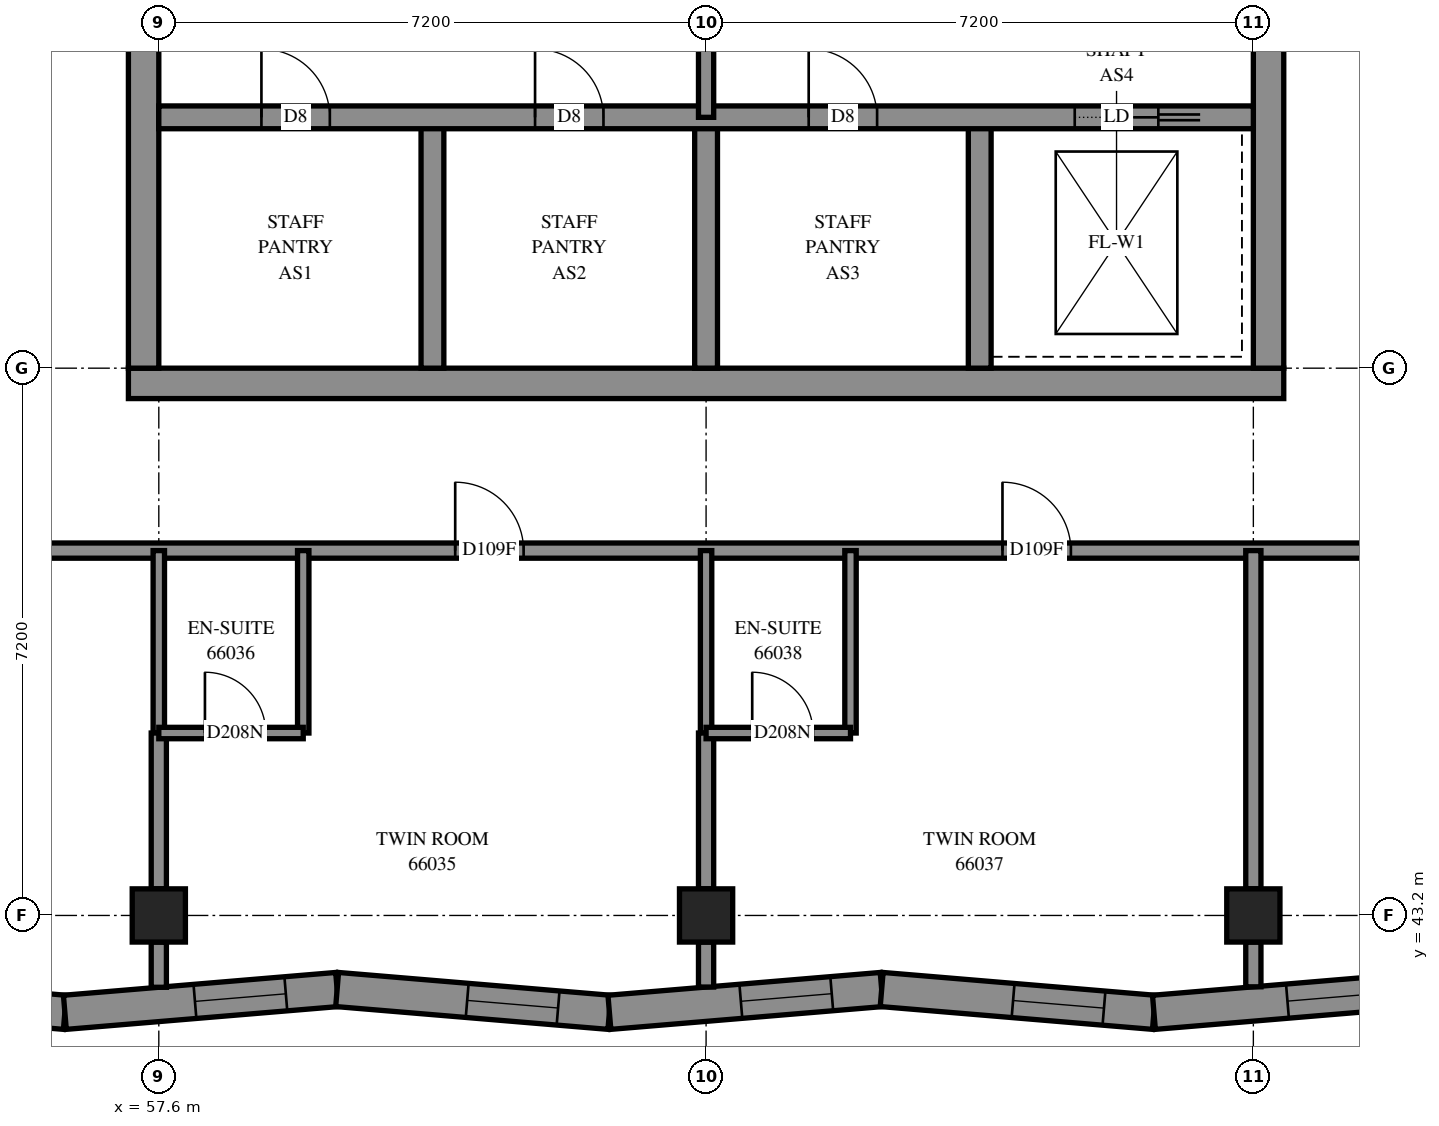
"""IFC4 building model, lengths in metres.
Left out: names, types, materials, properties, quantities, classifications, styles, units other than length and angle.
Written with IfcOpenShell. Run it as: python <this file> out.ifc"""

import sys

from ifc_helpers import new_model, si_unit, direction, frame, frame_2d, origin, origin_2d, place, context, subcontext, project, spatial, polyline, rectangle, outline, extrude, element, fill, save


model = new_model("IFC4")
c1 = context("Model", 3, precision=1e-05, world=origin(), true_north=direction((0.0, 1.0)))
c2 = subcontext(c1, "Body", "Model", "MODEL_VIEW")
j1 = project(units=[si_unit("LENGTHUNIT", "METRE"), si_unit("PLANEANGLEUNIT", "RADIAN")], contexts=[c1])
p1 = place(None, origin())
s1 = spatial("IfcSite", under=j1, at=p1, CompositionType="ELEMENT")
p2 = place(p1, origin())
s2 = spatial("IfcBuilding", under=s1, at=p2, CompositionType="ELEMENT")
p3 = place(p2, frame((0.0, 0.0, 243.8)))
s3 = spatial("IfcBuildingStorey", under=s2, at=p3, CompositionType="ELEMENT", Elevation=243.8)
for number, where, z_axis, x_axis in (
    (1, (57.6, 43.2, 0.0), (0.0, 0.0, 1.0), (1.0, 0.0, 0.0)),
    (2, (64.8, 43.2, 0.0), (0.0, 0.0, 1.0), (1.0, 0.0, 0.0)),
    (3, (72.0, 43.2, 0.0), (0.0, 0.0, 1.0), (1.0, 0.0, 0.0)),
):
    element("IfcColumn", number, at=place(p3, frame(where, z_axis=z_axis, x_axis=x_axis)), inside=s3, PredefinedType="COLUMN", context=c2, shape_type="SweptSolid", body=[
        extrude(rectangle(XDim=0.7, YDim=0.7, at=origin_2d()), origin(), (0.0, 0.0, 1.0), 3.1),
    ])
p4 = place(p3, frame((57.2, 50.2, -0.3), z_axis=(0.0, 0.0, 1.0), x_axis=(1.0, 0.0, 0.0)))
e4 = element("IfcWall", 4, at=p4, inside=s3, PredefinedType="SHEAR", context=c2, shape_type="SweptSolid", body=[
    extrude(rectangle(XDim=15.2, YDim=0.4, at=frame_2d((7.6, 0.0))), origin(), (0.0, 0.0, 1.0), 2.7),
])
p5 = place(p3, frame((57.4, 50.4, -0.3), z_axis=(0.0, 0.0, 1.0), x_axis=(0.0, 1.0, 0.0)))
e5 = element("IfcWall", 5, at=p5, inside=s3, PredefinedType="SHEAR", context=c2, shape_type="SweptSolid", body=[
    extrude(rectangle(XDim=14.4, YDim=0.4, at=frame_2d((7.2, 0.0))), origin(), (0.0, 0.0, 1.0), 2.7),
])
p6 = place(p5, frame((4.55, 0.0, 0.3)))
e6 = element("IfcOpeningElement", 6, at=p6, cuts=e5, PredefinedType="OPENING", context=c2, shape_type="SweptSolid", body=[
    extrude(rectangle(XDim=1.1, YDim=2.1, at=frame_2d((0.55, 1.05))), frame((0.0, 0.21, 0.0), z_axis=(0.0, -1.0, 0.0), x_axis=(1.0, 0.0, 0.0)), (0.0, 0.0, 1.0), 0.42),
])
p7 = place(p5, frame((11.35, 0.0, 0.3)))
e7 = element("IfcOpeningElement", 7, at=p7, cuts=e5, PredefinedType="OPENING", context=c2, shape_type="SweptSolid", body=[
    extrude(rectangle(XDim=1.1, YDim=2.1, at=frame_2d((0.55, 1.05))), frame((0.0, 0.21, 0.0), z_axis=(0.0, -1.0, 0.0), x_axis=(1.0, 0.0, 0.0)), (0.0, 0.0, 1.0), 0.42),
])
p8 = place(p3, frame((72.2, 50.4, -0.3), z_axis=(0.0, 0.0, 1.0), x_axis=(0.0, 1.0, 0.0)))
e8 = element("IfcWall", 8, at=p8, inside=s3, PredefinedType="SHEAR", context=c2, shape_type="SweptSolid", body=[
    extrude(rectangle(XDim=14.4, YDim=0.4, at=frame_2d((7.2, 0.0))), origin(), (0.0, 0.0, 1.0), 2.7),
])
p9 = place(p8, frame((4.55, 0.0, 0.3)))
e9 = element("IfcOpeningElement", 9, at=p9, cuts=e8, PredefinedType="OPENING", context=c2, shape_type="SweptSolid", body=[
    extrude(rectangle(XDim=1.1, YDim=2.1, at=frame_2d((0.55, 1.05))), frame((0.0, 0.21, 0.0), z_axis=(0.0, -1.0, 0.0), x_axis=(1.0, 0.0, 0.0)), (0.0, 0.0, 1.0), 0.42),
])
p10 = place(p8, frame((11.35, 0.0, 0.3)))
e10 = element("IfcOpeningElement", 10, at=p10, cuts=e8, PredefinedType="OPENING", context=c2, shape_type="SweptSolid", body=[
    extrude(rectangle(XDim=1.1, YDim=2.1, at=frame_2d((0.55, 1.05))), frame((0.0, 0.21, 0.0), z_axis=(0.0, -1.0, 0.0), x_axis=(1.0, 0.0, 0.0)), (0.0, 0.0, 1.0), 0.42),
])
for number, where, z_axis, x_axis in (
    (11, (61.2, 50.4, 0.0), (0.0, 0.0, 1.0), (0.0, 1.0, 0.0)),
    (12, (64.8, 50.4, 0.0), (0.0, 0.0, 1.0), (0.0, 1.0, 0.0)),
    (13, (68.4, 50.4, 0.0), (0.0, 0.0, 1.0), (0.0, 1.0, 0.0)),
):
    element("IfcWall", number, at=place(p3, frame(where, z_axis=z_axis, x_axis=x_axis)), inside=s3, PredefinedType="SOLIDWALL", context=c2, shape_type="SweptSolid", body=[
        extrude(rectangle(XDim=3.3, YDim=0.3, at=frame_2d((1.65, 0.0))), origin(), (0.0, 0.0, 1.0), 3.1),
    ])
p11 = place(p3, frame((57.6, 53.7, 0.0), z_axis=(0.0, 0.0, 1.0), x_axis=(1.0, 0.0, 0.0)))
e14 = element("IfcWall", 14, at=p11, inside=s3, PredefinedType="SOLIDWALL", context=c2, shape_type="SweptSolid", body=[
    extrude(rectangle(XDim=14.4, YDim=0.3, at=frame_2d((7.2, 0.0))), origin(), (0.0, 0.0, 1.0), 3.1),
])
p12 = place(p11, frame((1.35, 0.0, 0.0)))
e15 = element("IfcOpeningElement", 15, at=p12, cuts=e14, PredefinedType="OPENING", context=c2, shape_type="SweptSolid", body=[
    extrude(rectangle(XDim=0.9, YDim=2.1, at=frame_2d((0.45, 1.05))), frame((0.0, 0.16, 0.0), z_axis=(0.0, -1.0, 0.0), x_axis=(1.0, 0.0, 0.0)), (0.0, 0.0, 1.0), 0.32),
])
p13 = place(p11, frame((4.95, 0.0, 0.0)))
e16 = element("IfcOpeningElement", 16, at=p13, cuts=e14, PredefinedType="OPENING", context=c2, shape_type="SweptSolid", body=[
    extrude(rectangle(XDim=0.9, YDim=2.1, at=frame_2d((0.45, 1.05))), frame((0.0, 0.16, 0.0), z_axis=(0.0, -1.0, 0.0), x_axis=(1.0, 0.0, 0.0)), (0.0, 0.0, 1.0), 0.32),
])
p14 = place(p11, frame((8.55, 0.0, 0.0)))
e17 = element("IfcOpeningElement", 17, at=p14, cuts=e14, PredefinedType="OPENING", context=c2, shape_type="SweptSolid", body=[
    extrude(rectangle(XDim=0.9, YDim=2.1, at=frame_2d((0.45, 1.05))), frame((0.0, 0.16, 0.0), z_axis=(0.0, -1.0, 0.0), x_axis=(1.0, 0.0, 0.0)), (0.0, 0.0, 1.0), 0.32),
])
p15 = place(p11, frame((12.05, 0.0, 0.0)))
e18 = element("IfcOpeningElement", 18, at=p15, cuts=e14, PredefinedType="OPENING", context=c2, shape_type="SweptSolid", body=[
    extrude(rectangle(XDim=1.1, YDim=2.1, at=frame_2d((0.55, 1.05))), frame((0.0, 0.16, 0.0), z_axis=(0.0, -1.0, 0.0), x_axis=(1.0, 0.0, 0.0)), (0.0, 0.0, 1.0), 0.32),
])
p16 = place(p3, frame((52.764, 42.227, 0.0), z_axis=(0.0, 0.0, 1.0), x_axis=(0.9965122743, -0.0834463132, 0.0)))
e19 = element("IfcWall", 19, at=p16, inside=s3, PredefinedType="SOLIDWALL", context=c2, shape_type="SweptSolid", body=[
    extrude(outline(polyline([(0.037, -0.225), (3.632, -0.225), (3.594, 0.225), (-0.037, 0.225), (0.037, -0.225)])), origin(), (0.0, 0.0, 1.0), 3.1),
])
p17 = place(p16, frame((1.718, 0.0, 0.45)))
e20 = element("IfcOpeningElement", 20, at=p17, cuts=e19, PredefinedType="OPENING", context=c2, shape_type="SweptSolid", body=[
    extrude(rectangle(XDim=1.2, YDim=2.55, at=frame_2d((0.6, 1.275))), frame((0.0, 0.235, 0.0), z_axis=(0.0, -1.0, 0.0), x_axis=(1.0, 0.0, 0.0)), (0.0, 0.0, 1.0), 0.47),
])
p18 = place(p3, frame((56.364, 41.926, 0.0), z_axis=(0.0, 0.0, 1.0), x_axis=(0.9965111369, 0.0834598942, 0.0)))
e21 = element("IfcWall", 21, at=p18, inside=s3, PredefinedType="SOLIDWALL", context=c2, shape_type="SweptSolid", body=[
    extrude(outline(polyline([(-0.019, -0.225), (3.576, -0.225), (3.613, 0.225), (0.019, 0.225), (-0.019, -0.225)])), origin(), (0.0, 0.0, 1.0), 3.1),
])
p19 = place(p18, frame((1.717, 0.0, 0.45)))
e22 = element("IfcOpeningElement", 22, at=p19, cuts=e21, PredefinedType="OPENING", context=c2, shape_type="SweptSolid", body=[
    extrude(rectangle(XDim=1.2, YDim=2.55, at=frame_2d((0.6, 1.275))), frame((0.0, 0.235, 0.0), z_axis=(0.0, -1.0, 0.0), x_axis=(1.0, 0.0, 0.0)), (0.0, 0.0, 1.0), 0.47),
])
p20 = place(p3, frame((59.946, 42.226, 0.0), z_axis=(0.0, 0.0, 1.0), x_axis=(0.9965109432, -0.083462208, 0.0)))
e23 = element("IfcWall", 23, at=p20, inside=s3, PredefinedType="SOLIDWALL", context=c2, shape_type="SweptSolid", body=[
    extrude(outline(polyline([(0.019, -0.225), (3.613, -0.225), (3.576, 0.225), (-0.019, 0.225), (0.019, -0.225)])), origin(), (0.0, 0.0, 1.0), 3.1),
])
p21 = place(p20, frame((1.717, 0.0, 0.45)))
e24 = element("IfcOpeningElement", 24, at=p21, cuts=e23, PredefinedType="OPENING", context=c2, shape_type="SweptSolid", body=[
    extrude(rectangle(XDim=1.2, YDim=2.55, at=frame_2d((0.6, 1.275))), frame((0.0, 0.235, 0.0), z_axis=(0.0, -1.0, 0.0), x_axis=(1.0, 0.0, 0.0)), (0.0, 0.0, 1.0), 0.47),
])
p22 = place(p3, frame((63.528, 41.926, 0.0), z_axis=(0.0, 0.0, 1.0), x_axis=(0.9965111369, 0.0834598942, 0.0)))
e25 = element("IfcWall", 25, at=p22, inside=s3, PredefinedType="SOLIDWALL", context=c2, shape_type="SweptSolid", body=[
    extrude(outline(polyline([(-0.019, -0.225), (3.576, -0.225), (3.613, 0.225), (0.019, 0.225), (-0.019, -0.225)])), origin(), (0.0, 0.0, 1.0), 3.1),
])
p23 = place(p22, frame((1.736, 0.0, 0.45)))
e26 = element("IfcOpeningElement", 26, at=p23, cuts=e25, PredefinedType="OPENING", context=c2, shape_type="SweptSolid", body=[
    extrude(rectangle(XDim=1.2, YDim=2.55, at=frame_2d((0.6, 1.275))), frame((0.0, 0.235, 0.0), z_axis=(0.0, -1.0, 0.0), x_axis=(1.0, 0.0, 0.0)), (0.0, 0.0, 1.0), 0.47),
])
p24 = place(p3, frame((67.11, 42.226, 0.0), z_axis=(0.0, 0.0, 1.0), x_axis=(0.9965111369, -0.0834598942, 0.0)))
e27 = element("IfcWall", 27, at=p24, inside=s3, PredefinedType="SOLIDWALL", context=c2, shape_type="SweptSolid", body=[
    extrude(outline(polyline([(0.019, -0.225), (3.613, -0.225), (3.576, 0.225), (-0.019, 0.225), (0.019, -0.225)])), origin(), (0.0, 0.0, 1.0), 3.1),
])
p25 = place(p24, frame((1.735, 0.0, 0.45)))
e28 = element("IfcOpeningElement", 28, at=p25, cuts=e27, PredefinedType="OPENING", context=c2, shape_type="SweptSolid", body=[
    extrude(rectangle(XDim=1.2, YDim=2.55, at=frame_2d((0.6, 1.275))), frame((0.0, 0.235, 0.0), z_axis=(0.0, -1.0, 0.0), x_axis=(1.0, 0.0, 0.0)), (0.0, 0.0, 1.0), 0.47),
])
p26 = place(p3, frame((70.692, 41.926, 0.0), z_axis=(0.0, 0.0, 1.0), x_axis=(0.9965122743, 0.0834463132, 0.0)))
e29 = element("IfcWall", 29, at=p26, inside=s3, PredefinedType="SOLIDWALL", context=c2, shape_type="SweptSolid", body=[
    extrude(outline(polyline([(-0.019, -0.225), (3.576, -0.225), (3.651, 0.225), (0.019, 0.225), (-0.019, -0.225)])), origin(), (0.0, 0.0, 1.0), 3.1),
])
p27 = place(p26, frame((1.763, 0.0, 0.45)))
e30 = element("IfcOpeningElement", 30, at=p27, cuts=e29, PredefinedType="OPENING", context=c2, shape_type="SweptSolid", body=[
    extrude(rectangle(XDim=1.2, YDim=2.55, at=frame_2d((0.6, 1.275))), frame((0.0, 0.235, 0.0), z_axis=(0.0, -1.0, 0.0), x_axis=(1.0, 0.0, 0.0)), (0.0, 0.0, 1.0), 0.47),
])
p28 = place(p3, frame((64.8, 53.7, 0.0), z_axis=(0.0, 0.0, 1.0), x_axis=(0.0, 1.0, 0.0)))
e31 = element("IfcWall", 31, at=p28, inside=s3, PredefinedType="PARTITIONING", context=c2, shape_type="SweptSolid", body=[
    extrude(rectangle(XDim=3.6, YDim=0.2, at=frame_2d((1.8, 0.0))), origin(), (0.0, 0.0, 1.0), 3.1),
])
p29 = place(p3, frame((55.2, 48.0, 0.0), z_axis=(0.0, 0.0, 1.0), x_axis=(1.0, 0.0, 0.0)))
e32 = element("IfcWall", 32, at=p29, inside=s3, PredefinedType="PARTITIONING", context=c2, shape_type="SweptSolid", body=[
    extrude(rectangle(XDim=19.15, YDim=0.2, at=frame_2d((9.575, 0.0))), origin(), (0.0, 0.0, 1.0), 3.1),
])
p30 = place(p29, frame((6.299, 0.0, 0.0)))
e33 = element("IfcOpeningElement", 33, at=p30, cuts=e32, PredefinedType="OPENING", context=c2, shape_type="SweptSolid", body=[
    extrude(rectangle(XDim=0.9, YDim=2.1, at=frame_2d((0.45, 1.05))), frame((0.0, 0.11, 0.0), z_axis=(0.0, -1.0, 0.0), x_axis=(1.0, 0.0, 0.0)), (0.0, 0.0, 1.0), 0.22),
])
p31 = place(p29, frame((13.499, 0.0, 0.0)))
e34 = element("IfcOpeningElement", 34, at=p31, cuts=e32, PredefinedType="OPENING", context=c2, shape_type="SweptSolid", body=[
    extrude(rectangle(XDim=0.9, YDim=2.1, at=frame_2d((0.45, 1.05))), frame((0.0, 0.11, 0.0), z_axis=(0.0, -1.0, 0.0), x_axis=(1.0, 0.0, 0.0)), (0.0, 0.0, 1.0), 0.22),
])
p32 = place(p3, frame((72.0, 43.55, 0.0), z_axis=(0.0, 0.0, 1.0), x_axis=(0.0, 1.0, 0.0)))
e35 = element("IfcWall", 35, at=p32, inside=s3, PredefinedType="PARTITIONING", context=c2, shape_type="SweptSolid", body=[
    extrude(rectangle(XDim=4.45, YDim=0.2, at=frame_2d((2.225, 0.0))), origin(), (0.0, 0.0, 1.0), 3.1),
])
for number, where, z_axis, x_axis in (
    (36, (59.5, 45.6, 0.0), (0.0, 0.0, 1.0), (0.0, 1.0, 0.0)),
    (37, (57.6, 45.6, 0.0), (0.0, 0.0, 1.0), (0.0, 1.0, 0.0)),
    (38, (66.7, 45.6, 0.0), (0.0, 0.0, 1.0), (0.0, 1.0, 0.0)),
    (39, (64.8, 45.6, 0.0), (0.0, 0.0, 1.0), (0.0, 1.0, 0.0)),
):
    element("IfcWall", number, at=place(p3, frame(where, z_axis=z_axis, x_axis=x_axis)), inside=s3, PredefinedType="PARTITIONING", context=c2, shape_type="SweptSolid", body=[
        extrude(rectangle(XDim=2.4, YDim=0.15, at=frame_2d((1.2, 0.0))), origin(), (0.0, 0.0, 1.0), 3.1),
    ])
for number, where, z_axis, x_axis in (
    (40, (57.6, 43.55, 0.0), (0.0, 0.0, 1.0), (0.0, 1.0, 0.0)),
    (41, (64.8, 43.55, 0.0), (0.0, 0.0, 1.0), (0.0, 1.0, 0.0)),
):
    element("IfcWall", number, at=place(p3, frame(where, z_axis=z_axis, x_axis=x_axis)), inside=s3, PredefinedType="PARTITIONING", context=c2, shape_type="SweptSolid", body=[
        extrude(rectangle(XDim=2.05, YDim=0.2, at=frame_2d((1.025, 0.0))), origin(), (0.0, 0.0, 1.0), 3.1),
    ])
p33 = place(p3, frame((64.8, 45.6, 0.0), z_axis=(0.0, 0.0, 1.0), x_axis=(1.0, 0.0, 0.0)))
e42 = element("IfcWall", 42, at=p33, inside=s3, PredefinedType="PARTITIONING", context=c2, shape_type="SweptSolid", body=[
    extrude(rectangle(XDim=1.9, YDim=0.15, at=frame_2d((0.95, 0.0))), origin(), (0.0, 0.0, 1.0), 3.1),
])
p34 = place(p33, frame((0.607, 0.0, 0.0)))
e43 = element("IfcOpeningElement", 43, at=p34, cuts=e42, PredefinedType="OPENING", context=c2, shape_type="SweptSolid", body=[
    extrude(rectangle(XDim=0.8, YDim=2.1, at=frame_2d((0.4, 1.05))), frame((0.0, 0.085, 0.0), z_axis=(0.0, -1.0, 0.0), x_axis=(1.0, 0.0, 0.0)), (0.0, 0.0, 1.0), 0.17),
])
p35 = place(p3, frame((57.6, 45.6, 0.0), z_axis=(0.0, 0.0, 1.0), x_axis=(1.0, 0.0, 0.0)))
e44 = element("IfcWall", 44, at=p35, inside=s3, PredefinedType="PARTITIONING", context=c2, shape_type="SweptSolid", body=[
    extrude(rectangle(XDim=1.9, YDim=0.15, at=frame_2d((0.95, 0.0))), origin(), (0.0, 0.0, 1.0), 3.1),
])
p36 = place(p35, frame((0.607, 0.0, 0.0)))
e45 = element("IfcOpeningElement", 45, at=p36, cuts=e44, PredefinedType="OPENING", context=c2, shape_type="SweptSolid", body=[
    extrude(rectangle(XDim=0.8, YDim=2.1, at=frame_2d((0.4, 1.05))), frame((0.0, 0.085, 0.0), z_axis=(0.0, -1.0, 0.0), x_axis=(1.0, 0.0, 0.0)), (0.0, 0.0, 1.0), 0.17),
])
p37 = place(p3, frame((57.6, 42.255, 0.0), z_axis=(0.0, 0.0, 1.0), x_axis=(0.0, 1.0, 0.0)))
e46 = element("IfcWall", 46, at=p37, inside=s3, PredefinedType="PARTITIONING", context=c2, shape_type="SweptSolid", body=[
    extrude(rectangle(XDim=0.595, YDim=0.2, at=frame_2d((0.297, 0.0))), origin(), (0.0, 0.0, 1.0), 3.1),
])
p38 = place(p3, frame((64.8, 42.258, 0.0), z_axis=(0.0, 0.0, 1.0), x_axis=(0.0, 1.0, 0.0)))
e47 = element("IfcWall", 47, at=p38, inside=s3, PredefinedType="PARTITIONING", context=c2, shape_type="SweptSolid", body=[
    extrude(rectangle(XDim=0.592, YDim=0.2, at=frame_2d((0.296, 0.0))), origin(), (0.0, 0.0, 1.0), 3.1),
])
p39 = place(p3, frame((72.0, 42.261, 0.0), z_axis=(0.0, 0.0, 1.0), x_axis=(0.0, 1.0, 0.0)))
e48 = element("IfcWall", 48, at=p39, inside=s3, PredefinedType="PARTITIONING", context=c2, shape_type="SweptSolid", body=[
    extrude(rectangle(XDim=0.589, YDim=0.2, at=frame_2d((0.294, 0.0))), origin(), (0.0, 0.0, 1.0), 3.1),
])
p40 = place(p19, origin())
e49 = element("IfcWindow", 49, at=p40, inside=s3, PartitioningType="SINGLE_PANEL", PredefinedType="WINDOW", context=c2, shape_type="SweptSolid", body=[
    extrude(rectangle(XDim=1.2, YDim=2.55, at=frame_2d((0.6, 1.275))), frame((0.0, 0.205, 0.0), z_axis=(0.0, -1.0, 0.0), x_axis=(1.0, 0.0, 0.0)), (0.0, 0.0, 1.0), 0.06),
])
fill(e22, e49)
p41 = place(p21, origin())
e50 = element("IfcWindow", 50, at=p41, inside=s3, PartitioningType="SINGLE_PANEL", PredefinedType="WINDOW", context=c2, shape_type="SweptSolid", body=[
    extrude(rectangle(XDim=1.2, YDim=2.55, at=frame_2d((0.6, 1.275))), frame((0.0, 0.205, 0.0), z_axis=(0.0, -1.0, 0.0), x_axis=(1.0, 0.0, 0.0)), (0.0, 0.0, 1.0), 0.06),
])
fill(e24, e50)
p42 = place(p23, origin())
e51 = element("IfcWindow", 51, at=p42, inside=s3, PartitioningType="SINGLE_PANEL", PredefinedType="WINDOW", context=c2, shape_type="SweptSolid", body=[
    extrude(rectangle(XDim=1.2, YDim=2.55, at=frame_2d((0.6, 1.275))), frame((0.0, 0.205, 0.0), z_axis=(0.0, -1.0, 0.0), x_axis=(1.0, 0.0, 0.0)), (0.0, 0.0, 1.0), 0.06),
])
fill(e26, e51)
p43 = place(p25, origin())
e52 = element("IfcWindow", 52, at=p43, inside=s3, PartitioningType="SINGLE_PANEL", PredefinedType="WINDOW", context=c2, shape_type="SweptSolid", body=[
    extrude(rectangle(XDim=1.2, YDim=2.55, at=frame_2d((0.6, 1.275))), frame((0.0, 0.205, 0.0), z_axis=(0.0, -1.0, 0.0), x_axis=(1.0, 0.0, 0.0)), (0.0, 0.0, 1.0), 0.06),
])
fill(e28, e52)
p44 = place(p27, origin())
e53 = element("IfcWindow", 53, at=p44, inside=s3, PartitioningType="SINGLE_PANEL", PredefinedType="WINDOW", context=c2, shape_type="SweptSolid", body=[
    extrude(rectangle(XDim=1.2, YDim=2.55, at=frame_2d((0.6, 1.275))), frame((0.0, 0.205, 0.0), z_axis=(0.0, -1.0, 0.0), x_axis=(1.0, 0.0, 0.0)), (0.0, 0.0, 1.0), 0.06),
])
fill(e30, e53)
p45 = place(p12, origin())
e54 = element("IfcDoor", 54, at=p45, inside=s3, OperationType="SINGLE_SWING_LEFT", PredefinedType="DOOR", context=c2, shape_type="SweptSolid", body=[
    extrude(rectangle(XDim=0.9, YDim=2.1, at=frame_2d((0.45, 1.05))), frame((0.0, 0.025, 0.0), z_axis=(0.0, -1.0, 0.0), x_axis=(1.0, 0.0, 0.0)), (0.0, 0.0, 1.0), 0.05),
])
fill(e15, e54)
p46 = place(p13, origin())
e55 = element("IfcDoor", 55, at=p46, inside=s3, OperationType="SINGLE_SWING_LEFT", PredefinedType="DOOR", context=c2, shape_type="SweptSolid", body=[
    extrude(rectangle(XDim=0.9, YDim=2.1, at=frame_2d((0.45, 1.05))), frame((0.0, 0.025, 0.0), z_axis=(0.0, -1.0, 0.0), x_axis=(1.0, 0.0, 0.0)), (0.0, 0.0, 1.0), 0.05),
])
fill(e16, e55)
p47 = place(p14, origin())
e56 = element("IfcDoor", 56, at=p47, inside=s3, OperationType="SINGLE_SWING_LEFT", PredefinedType="DOOR", context=c2, shape_type="SweptSolid", body=[
    extrude(rectangle(XDim=0.9, YDim=2.1, at=frame_2d((0.45, 1.05))), frame((0.0, 0.025, 0.0), z_axis=(0.0, -1.0, 0.0), x_axis=(1.0, 0.0, 0.0)), (0.0, 0.0, 1.0), 0.05),
])
fill(e17, e56)
p48 = place(p15, origin())
e57 = element("IfcDoor", 57, at=p48, inside=s3, OperationType="SLIDING_TO_RIGHT", PredefinedType="DOOR", context=c2, shape_type="SweptSolid", body=[
    extrude(rectangle(XDim=1.1, YDim=2.1, at=frame_2d((0.55, 1.05))), frame((0.0, 0.025, 0.0), z_axis=(0.0, -1.0, 0.0), x_axis=(1.0, 0.0, 0.0)), (0.0, 0.0, 1.0), 0.05),
])
fill(e18, e57)
p49 = place(p30, origin())
e58 = element("IfcDoor", 58, at=p49, inside=s3, OperationType="SINGLE_SWING_LEFT", PredefinedType="DOOR", context=c2, shape_type="SweptSolid", body=[
    extrude(rectangle(XDim=0.9, YDim=2.1, at=frame_2d((0.45, 1.05))), frame((0.0, 0.025, 0.0), z_axis=(0.0, -1.0, 0.0), x_axis=(1.0, 0.0, 0.0)), (0.0, 0.0, 1.0), 0.05),
])
fill(e33, e58)
p50 = place(p36, origin())
e59 = element("IfcDoor", 59, at=p50, inside=s3, OperationType="SINGLE_SWING_RIGHT", PredefinedType="DOOR", context=c2, shape_type="SweptSolid", body=[
    extrude(rectangle(XDim=0.8, YDim=2.1, at=frame_2d((0.4, 1.05))), frame((0.0, 0.025, 0.0), z_axis=(0.0, -1.0, 0.0), x_axis=(1.0, 0.0, 0.0)), (0.0, 0.0, 1.0), 0.05),
])
fill(e45, e59)
p51 = place(p31, origin())
e60 = element("IfcDoor", 60, at=p51, inside=s3, OperationType="SINGLE_SWING_LEFT", PredefinedType="DOOR", context=c2, shape_type="SweptSolid", body=[
    extrude(rectangle(XDim=0.9, YDim=2.1, at=frame_2d((0.45, 1.05))), frame((0.0, 0.025, 0.0), z_axis=(0.0, -1.0, 0.0), x_axis=(1.0, 0.0, 0.0)), (0.0, 0.0, 1.0), 0.05),
])
fill(e34, e60)
p52 = place(p34, origin())
e61 = element("IfcDoor", 61, at=p52, inside=s3, OperationType="SINGLE_SWING_RIGHT", PredefinedType="DOOR", context=c2, shape_type="SweptSolid", body=[
    extrude(rectangle(XDim=0.8, YDim=2.1, at=frame_2d((0.4, 1.05))), frame((0.0, 0.025, 0.0), z_axis=(0.0, -1.0, 0.0), x_axis=(1.0, 0.0, 0.0)), (0.0, 0.0, 1.0), 0.05),
])
fill(e43, e61)
save(model, sys.argv[1])
